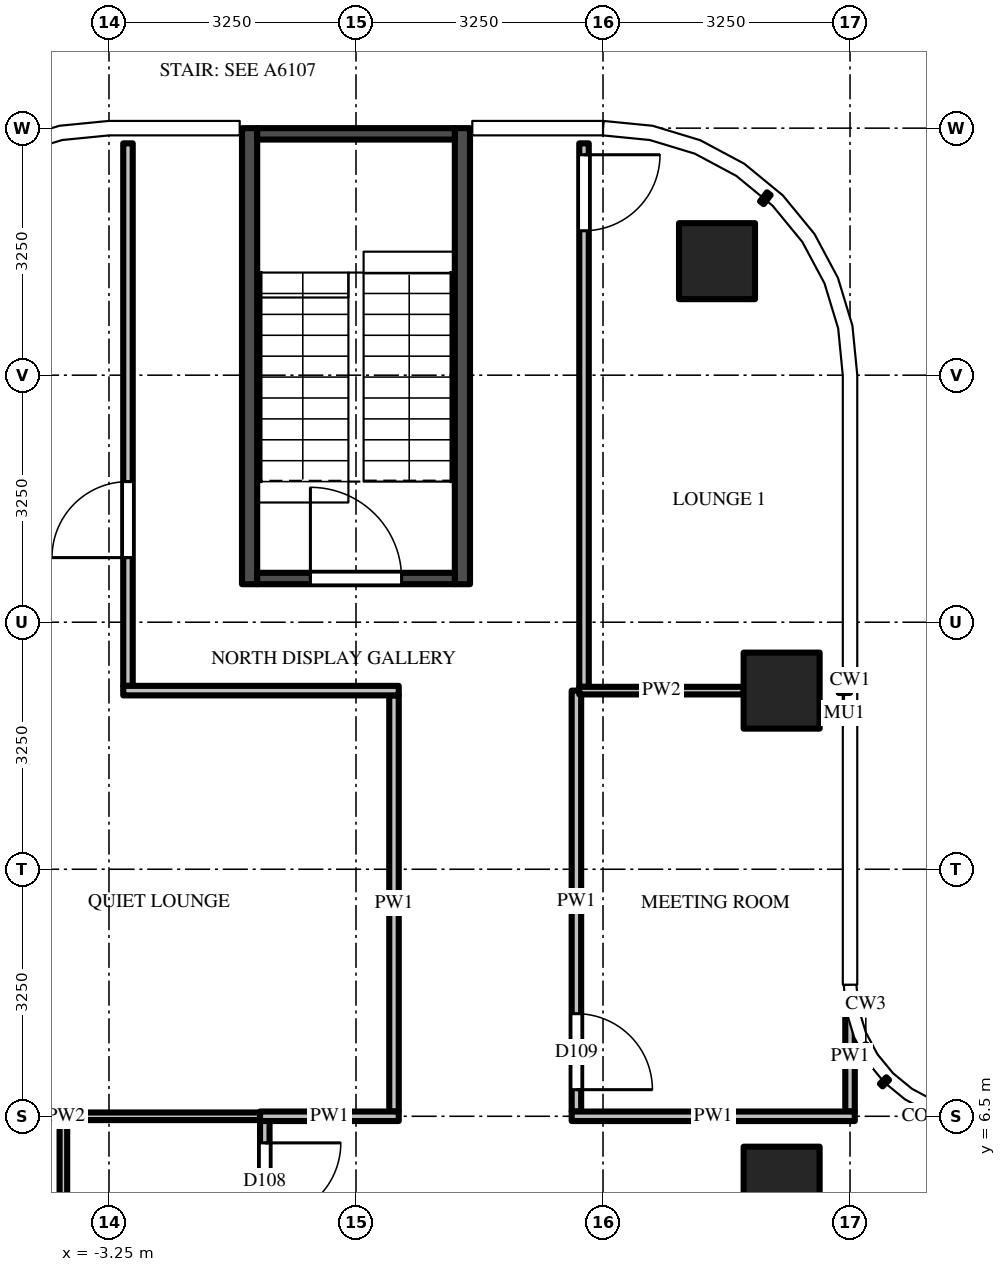
"""IFC4 building model, lengths in metres.
Left out: names, types, materials, properties, quantities, classifications, styles, units other than length and angle.
Written with IfcOpenShell. Run it as: python <this file> out.ifc"""

import sys

from ifc_helpers import new_model, si_unit, direction, frame, frame_2d, origin, origin_2d, place, context, subcontext, project, spatial, rectangle, extrude, source, transform, mapped, element, fill, save


model = new_model("IFC4")
c1 = context("Model", 3, precision=1e-05, world=origin(), true_north=direction((0.0, 1.0)))
c2 = subcontext(c1, "Body", "Model", "MODEL_VIEW")
j1 = project(units=[si_unit("LENGTHUNIT", "METRE"), si_unit("PLANEANGLEUNIT", "RADIAN")], contexts=[c1])
p1 = place(None, origin())
s1 = spatial("IfcSite", under=j1, at=p1, CompositionType="ELEMENT")
p2 = place(p1, origin())
s2 = spatial("IfcBuilding", under=s1, at=p2, CompositionType="ELEMENT")
p3 = place(p2, frame((0.0, 0.0, 318.4)))
s3 = spatial("IfcBuildingStorey", under=s2, at=p3, CompositionType="ELEMENT", Elevation=318.4)
m1 = source(origin(), c2, "Body", "SweptSolid", [
    extrude(rectangle(XDim=1.0, YDim=1.0, at=origin_2d()), origin(), (0.0, 0.0, 1.0), 3.9),
])
for number, where, z_axis, x_axis in (
    (1, (5.6, 12.1, 0.0), (0.0, 0.0, 1.0), (1.0, 0.0, 0.0)),
    (2, (4.75, 17.75, 0.0), (0.0, 0.0, 1.0), (1.0, 0.0, 0.0)),
    (3, (5.6, 5.6, 0.0), (0.0, 0.0, 1.0), (1.0, 0.0, 0.0)),
):
    element("IfcColumn", number, at=place(p3, frame(where, z_axis=z_axis, x_axis=x_axis)), inside=s3, PredefinedType="COLUMN", context=c2, shape_type="MappedRepresentation", body=[
        mapped(m1, transform((0.0, 0.0, 0.0))),
    ])
m2 = source(origin(), c2, "Body", "SweptSolid", [
    extrude(rectangle(XDim=6.0, YDim=0.2, at=frame_2d((3.0, 0.0))), origin(), (0.0, 0.0, 1.0), 3.7),
])
for number, where, z_axis, x_axis in (
    (4, (-1.4, 13.5, 0.0), (0.0, 0.0, 1.0), (0.0, 1.0, 0.0)),
    (5, (1.4, 13.5, 0.0), (0.0, 0.0, 1.0), (0.0, 1.0, 0.0)),
):
    element("IfcWall", number, at=place(p3, frame(where, z_axis=z_axis, x_axis=x_axis)), inside=s3, PredefinedType="SHEAR", context=c2, shape_type="MappedRepresentation", body=[
        mapped(m2, transform((0.0, 0.0, 0.0))),
    ])
m3 = source(origin(), c2, "Body", "SweptSolid", [
    extrude(rectangle(XDim=2.6, YDim=0.15, at=frame_2d((1.3, 0.0))), origin(), (0.0, 0.0, 1.0), 3.7),
])
p4 = place(p3, frame((-1.3, 13.575, 0.0), z_axis=(0.0, 0.0, 1.0), x_axis=(1.0, 0.0, 0.0)))
e6 = element("IfcWall", 6, at=p4, inside=s3, PredefinedType="SHEAR", context=c2, shape_type="MappedRepresentation", body=[
    mapped(m3, transform((0.0, 0.0, 0.0))),
])
m4 = source(origin(), c2, "Body", "SweptSolid", [
    extrude(rectangle(XDim=1.2, YDim=2.1, at=frame_2d((0.6, 1.05))), frame((0.0, 0.085, 0.0), z_axis=(0.0, -1.0, 0.0), x_axis=(1.0, 0.0, 0.0)), (0.0, 0.0, 1.0), 0.17),
])
p5 = place(p4, frame((0.7, 0.0, 0.0)))
e7 = element("IfcOpeningElement", 7, at=p5, cuts=e6, PredefinedType="OPENING", context=c2, shape_type="MappedRepresentation", body=[
    mapped(m4, transform((0.0, 0.0, 0.0))),
])
p6 = place(p3, frame((-1.3, 19.425, 0.0), z_axis=(0.0, 0.0, 1.0), x_axis=(1.0, 0.0, 0.0)))
e8 = element("IfcWall", 8, at=p6, inside=s3, PredefinedType="SHEAR", context=c2, shape_type="MappedRepresentation", body=[
    mapped(m3, transform((0.0, 0.0, 0.0))),
])
m5 = source(origin(), c2, "Body", "SweptSolid", [
    extrude(rectangle(XDim=3.137, YDim=0.1, at=frame_2d((1.569, 0.0))), origin(), (0.0, 0.0, 1.0), 2.997),
])
p7 = place(p3, frame((-3.85, 3.312, 0.0), z_axis=(0.0, 0.0, 1.0), x_axis=(0.0, 1.0, 0.0)))
e9 = element("IfcWall", 9, at=p7, inside=s3, PredefinedType="PARTITIONING", context=c2, shape_type="MappedRepresentation", body=[
    mapped(m5, transform((0.0, 0.0, 0.0))),
])
m6 = source(origin(), c2, "Body", "SweptSolid", [
    extrude(rectangle(XDim=7.137, YDim=0.125, at=frame_2d((3.569, 0.0))), origin(), (0.0, 0.0, 1.0), 2.78),
])
p8 = place(p3, frame((-3.0, 12.163, 0.0), z_axis=(0.0, 0.0, 1.0), x_axis=(0.0, 1.0, 0.0)))
e10 = element("IfcWall", 10, at=p8, inside=s3, PredefinedType="PARTITIONING", context=c2, shape_type="MappedRepresentation", body=[
    mapped(m6, transform((0.0, 0.0, 0.0))),
])
m7 = source(origin(), c2, "Body", "SweptSolid", [
    extrude(rectangle(XDim=1.0, YDim=2.1, at=frame_2d((0.5, 1.05))), frame((0.0, 0.073, 0.0), z_axis=(0.0, -1.0, 0.0), x_axis=(1.0, 0.0, 0.0)), (0.0, 0.0, 1.0), 0.145),
])
p9 = place(p8, frame((1.688, 0.0, 0.0)))
e11 = element("IfcOpeningElement", 11, at=p9, cuts=e10, PredefinedType="OPENING", context=c2, shape_type="MappedRepresentation", body=[
    mapped(m7, transform((0.0, 0.0, 0.0))),
])
m8 = source(origin(), c2, "Body", "SweptSolid", [
    extrude(rectangle(XDim=3.137, YDim=0.125, at=frame_2d((1.569, 0.0))), origin(), (0.0, 0.0, 1.0), 2.997),
])
p10 = place(p3, frame((-1.2, 6.45, 0.0), z_axis=(0.0, 0.0, 1.0), x_axis=(0.0, -1.0, 0.0)))
e12 = element("IfcWall", 12, at=p10, inside=s3, PredefinedType="PARTITIONING", context=c2, shape_type="MappedRepresentation", body=[
    mapped(m8, transform((0.0, 0.0, 0.0))),
])
p11 = place(p10, frame((0.3, 0.0, 0.0)))
e13 = element("IfcOpeningElement", 13, at=p11, cuts=e12, PredefinedType="OPENING", context=c2, shape_type="MappedRepresentation", body=[
    mapped(m7, transform((0.0, 0.0, 0.0))),
])
m9 = source(origin(), c2, "Body", "SweptSolid", [
    extrude(rectangle(XDim=5.475, YDim=0.125, at=frame_2d((2.738, 0.0))), origin(), (0.0, 0.0, 1.0), 2.997),
])
p12 = place(p3, frame((0.5, 12.038, 0.0), z_axis=(0.0, 0.0, 1.0), x_axis=(0.0, -1.0, 0.0)))
e14 = element("IfcWall", 14, at=p12, inside=s3, PredefinedType="PARTITIONING", context=c2, shape_type="MappedRepresentation", body=[
    mapped(m9, transform((0.0, 0.0, 0.0))),
])
m10 = source(origin(), c2, "Body", "SweptSolid", [
    extrude(rectangle(XDim=5.538, YDim=0.125, at=frame_2d((2.769, 0.0))), origin(), (0.0, 0.0, 1.0), 2.997),
])
p13 = place(p3, frame((2.9, 12.1, 0.0), z_axis=(0.0, 0.0, 1.0), x_axis=(0.0, -1.0, 0.0)))
e15 = element("IfcWall", 15, at=p13, inside=s3, PredefinedType="PARTITIONING", context=c2, shape_type="MappedRepresentation", body=[
    mapped(m10, transform((0.0, 0.0, 0.0))),
])
p14 = place(p13, frame((4.25, 0.0, 0.0)))
e16 = element("IfcOpeningElement", 16, at=p14, cuts=e15, PredefinedType="OPENING", context=c2, shape_type="MappedRepresentation", body=[
    mapped(m7, transform((0.0, 0.0, 0.0))),
])
m11 = source(origin(), c2, "Body", "SweptSolid", [
    extrude(rectangle(XDim=7.15, YDim=0.125, at=frame_2d((3.575, 0.0))), origin(), (0.0, 0.0, 1.0), 2.78),
])
p15 = place(p3, frame((3.0, 19.3, 0.0), z_axis=(0.0, 0.0, 1.0), x_axis=(0.0, -1.0, 0.0)))
e17 = element("IfcWall", 17, at=p15, inside=s3, PredefinedType="PARTITIONING", context=c2, shape_type="MappedRepresentation", body=[
    mapped(m11, transform((0.0, 0.0, 0.0))),
])
p16 = place(p15, frame((0.15, 0.0, 0.0)))
e18 = element("IfcOpeningElement", 18, at=p16, cuts=e17, PredefinedType="OPENING", context=c2, shape_type="MappedRepresentation", body=[
    mapped(m7, transform((0.0, 0.0, 0.0))),
])
m12 = source(origin(), c2, "Body", "SweptSolid", [
    extrude(rectangle(XDim=1.469, YDim=0.125, at=frame_2d((0.734, 0.0))), origin(), (0.0, 0.0, 1.0), 3.7),
])
p17 = place(p3, frame((6.5, 6.562, 0.0), z_axis=(0.0, 0.0, 1.0), x_axis=(0.0, 1.0, 0.0)))
e19 = element("IfcWall", 19, at=p17, inside=s3, PredefinedType="PARTITIONING", context=c2, shape_type="MappedRepresentation", body=[
    mapped(m12, transform((0.0, 0.0, 0.0))),
])
m13 = source(origin(), c2, "Body", "SweptSolid", [
    extrude(rectangle(XDim=5.363, YDim=0.1, at=frame_2d((2.681, 0.0))), origin(), (0.0, 0.0, 1.0), 2.78),
])
p18 = place(p3, frame((-6.5, 6.5, 0.0), z_axis=(0.0, 0.0, 1.0), x_axis=(1.0, 0.0, 0.0)))
e20 = element("IfcWall", 20, at=p18, inside=s3, PredefinedType="PARTITIONING", context=c2, shape_type="MappedRepresentation", body=[
    mapped(m13, transform((0.0, 0.0, 0.0))),
])
m14 = source(origin(), c2, "Body", "SweptSolid", [
    extrude(rectangle(XDim=1.825, YDim=0.125, at=frame_2d((0.913, 0.0))), origin(), (0.0, 0.0, 1.0), 3.7),
])
p19 = place(p3, frame((-1.262, 6.5, 0.0), z_axis=(0.0, 0.0, 1.0), x_axis=(1.0, 0.0, 0.0)))
e21 = element("IfcWall", 21, at=p19, inside=s3, PredefinedType="PARTITIONING", context=c2, shape_type="MappedRepresentation", body=[
    mapped(m14, transform((0.0, 0.0, 0.0))),
])
m15 = source(origin(), c2, "Body", "SweptSolid", [
    extrude(rectangle(XDim=3.725, YDim=0.125, at=frame_2d((1.863, 0.0))), origin(), (0.0, 0.0, 1.0), 2.78),
])
p20 = place(p3, frame((2.837, 6.5, 0.0), z_axis=(0.0, 0.0, 1.0), x_axis=(1.0, 0.0, 0.0)))
e22 = element("IfcWall", 22, at=p20, inside=s3, PredefinedType="PARTITIONING", context=c2, shape_type="MappedRepresentation", body=[
    mapped(m15, transform((0.0, 0.0, 0.0))),
])
m16 = source(origin(), c2, "Body", "SweptSolid", [
    extrude(rectangle(XDim=2.163, YDim=0.1, at=frame_2d((1.081, 0.0))), origin(), (0.0, 0.0, 1.0), 2.997),
])
p21 = place(p3, frame((2.938, 12.1, 0.0), z_axis=(0.0, 0.0, 1.0), x_axis=(1.0, 0.0, 0.0)))
e23 = element("IfcWall", 23, at=p21, inside=s3, PredefinedType="PARTITIONING", context=c2, shape_type="MappedRepresentation", body=[
    mapped(m16, transform((0.0, 0.0, 0.0))),
])
m17 = source(origin(), c2, "Body", "SweptSolid", [
    extrude(rectangle(XDim=3.625, YDim=0.125, at=frame_2d((1.812, 0.0))), origin(), (0.0, 0.0, 1.0), 2.997),
])
p22 = place(p3, frame((0.562, 12.1, 0.0), z_axis=(0.0, 0.0, 1.0), x_axis=(-1.0, 0.0, 0.0)))
e24 = element("IfcWall", 24, at=p22, inside=s3, PredefinedType="PARTITIONING", context=c2, shape_type="MappedRepresentation", body=[
    mapped(m17, transform((0.0, 0.0, 0.0))),
])
m18 = source(origin(), c2, "Body", "SweptSolid", [
    extrude(rectangle(XDim=1.2, YDim=2.1, at=frame_2d((0.6, 1.05))), frame((0.0, 0.025, 0.0), z_axis=(0.0, -1.0, 0.0), x_axis=(1.0, 0.0, 0.0)), (0.0, 0.0, 1.0), 0.05),
])
p23 = place(p5, origin())
e25 = element("IfcDoor", 25, at=p23, inside=s3, OperationType="SINGLE_SWING_LEFT", PredefinedType="DOOR", context=c2, shape_type="MappedRepresentation", body=[
    mapped(m18, transform((0.0, 0.0, 0.0))),
])
fill(e7, e25)
m19 = source(origin(), c2, "Body", "SweptSolid", [
    extrude(rectangle(XDim=1.0, YDim=2.1, at=frame_2d((0.5, 1.05))), frame((0.0, 0.025, 0.0), z_axis=(0.0, -1.0, 0.0), x_axis=(1.0, 0.0, 0.0)), (0.0, 0.0, 1.0), 0.05),
])
p24 = place(p11, origin())
e26 = element("IfcDoor", 26, at=p24, inside=s3, OperationType="SINGLE_SWING_LEFT", PredefinedType="DOOR", context=c2, shape_type="MappedRepresentation", body=[
    mapped(m19, transform((0.0, 0.0, 0.0))),
])
fill(e13, e26)
p25 = place(p14, origin())
e27 = element("IfcDoor", 27, at=p25, inside=s3, OperationType="SINGLE_SWING_RIGHT", PredefinedType="DOOR", context=c2, shape_type="MappedRepresentation", body=[
    mapped(m19, transform((0.0, 0.0, 0.0))),
])
fill(e16, e27)
p26 = place(p9, origin())
e28 = element("IfcDoor", 28, at=p26, inside=s3, OperationType="SINGLE_SWING_LEFT", PredefinedType="DOOR", context=c2, shape_type="MappedRepresentation", body=[
    mapped(m19, transform((0.0, 0.0, 0.0))),
])
fill(e11, e28)
p27 = place(p16, origin())
e29 = element("IfcDoor", 29, at=p27, inside=s3, OperationType="SINGLE_SWING_LEFT", PredefinedType="DOOR", context=c2, shape_type="MappedRepresentation", body=[
    mapped(m19, transform((0.0, 0.0, 0.0))),
])
fill(e18, e29)
save(model, sys.argv[1])
